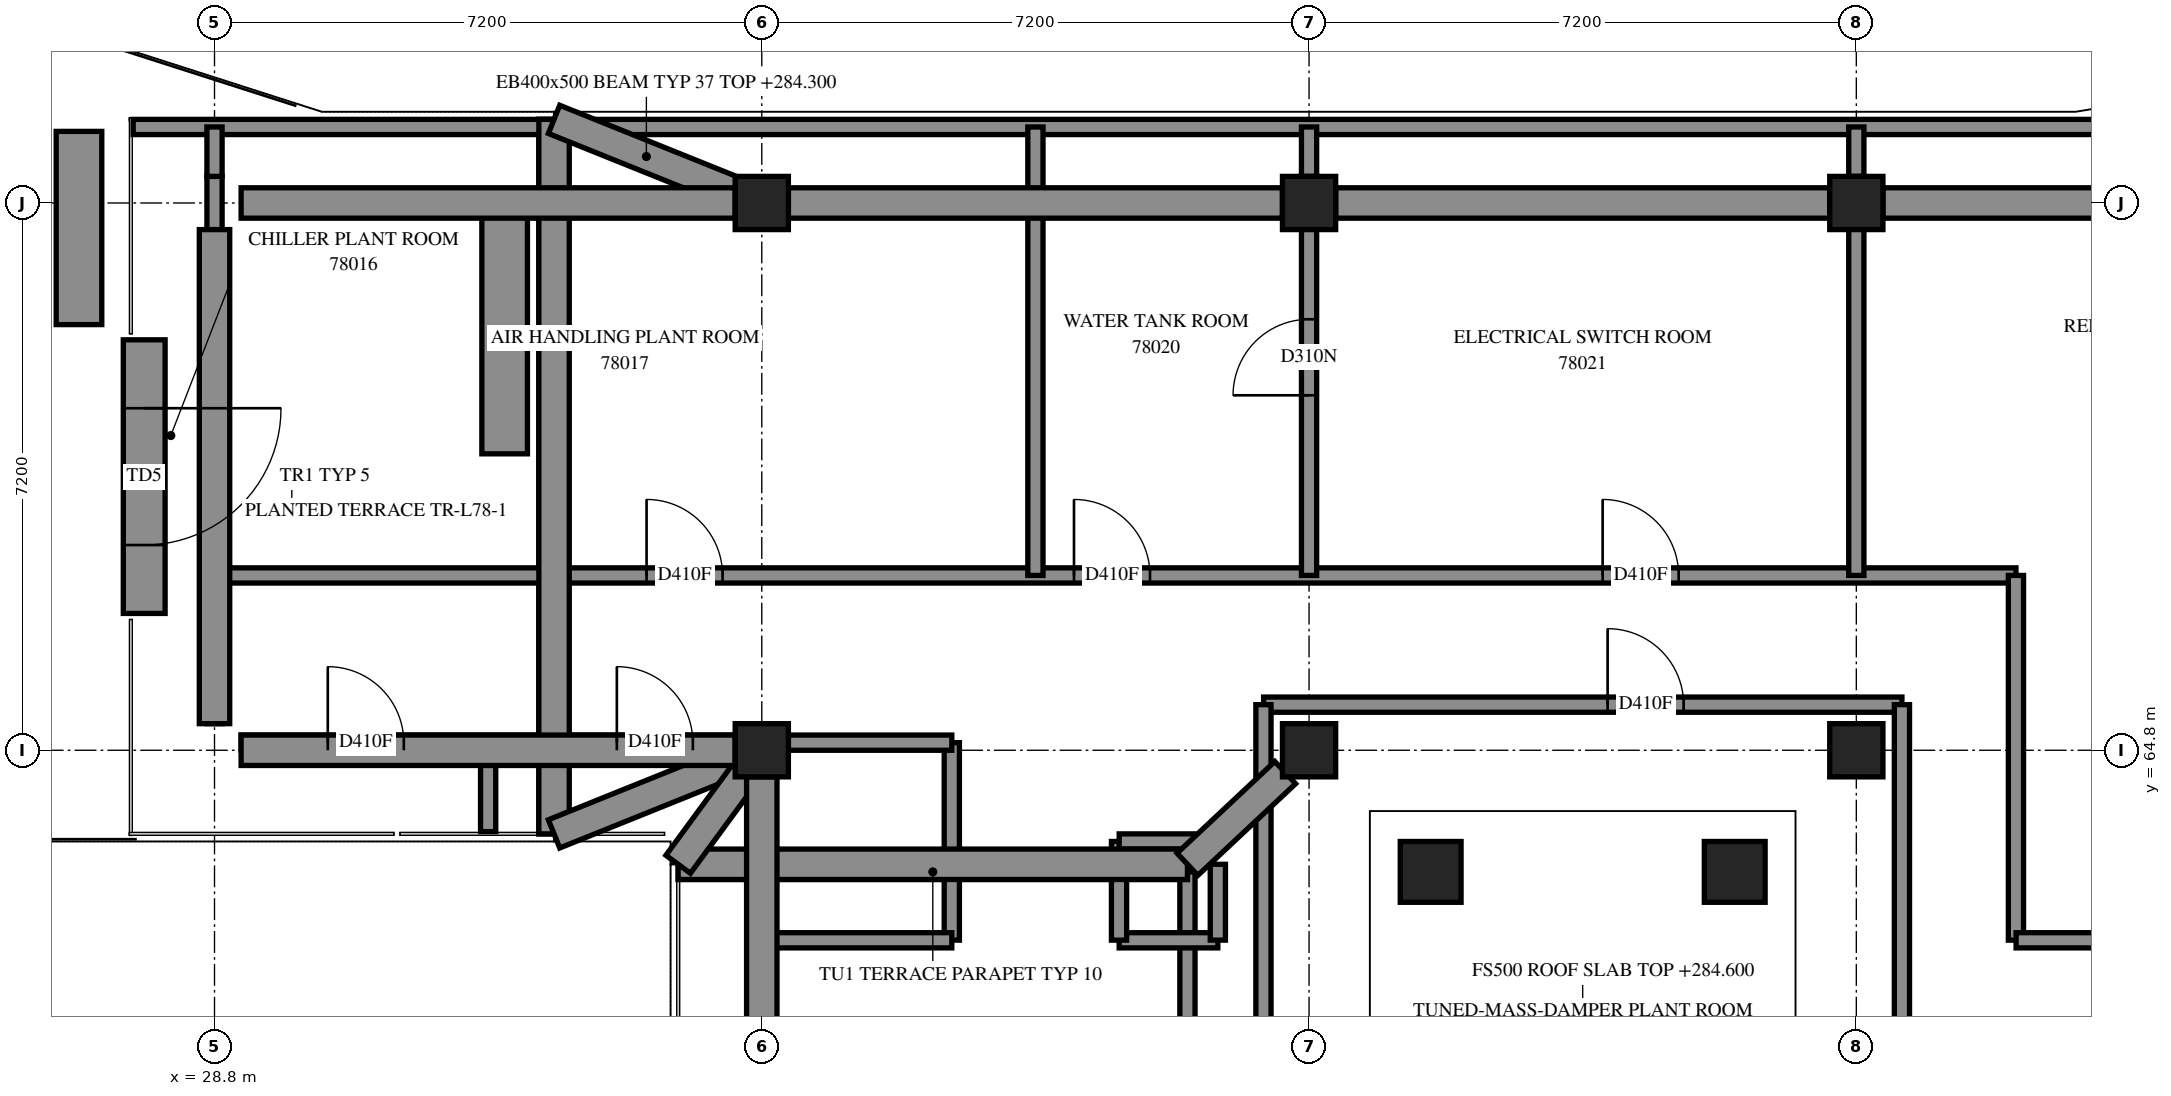
"""IFC4 building model, lengths in metres.
Left out: names, types, materials, properties, quantities, classifications, styles, units other than length and angle.
Written with IfcOpenShell. Run it as: python <this file> out.ifc"""

import sys

from ifc_helpers import new_model, si_unit, direction, frame, frame_2d, origin, origin_2d, place, context, subcontext, project, spatial, polyline, rectangle, outline, extrude, element, fill, save


model = new_model("IFC4")
c1 = context("Model", 3, precision=1e-05, world=origin(), true_north=direction((0.0, 1.0)))
c2 = subcontext(c1, "Body", "Model", "MODEL_VIEW")
j1 = project(units=[si_unit("LENGTHUNIT", "METRE"), si_unit("PLANEANGLEUNIT", "RADIAN")], contexts=[c1])
p1 = place(None, origin())
s1 = spatial("IfcSite", under=j1, at=p1, CompositionType="ELEMENT")
p2 = place(p1, origin())
s2 = spatial("IfcBuilding", under=s1, at=p2, CompositionType="ELEMENT")
p3 = place(p2, frame((0.0, 0.0, 284.6)))
s3 = spatial("IfcBuildingStorey", under=s2, at=p3, CompositionType="ELEMENT", Elevation=284.6)
for number, where, z_axis, x_axis in (
    (1, (36.0, 64.8, 0.0), (0.0, 0.0, 1.0), (1.0, 0.0, 0.0)),
    (2, (36.0, 72.0, 0.0), (0.0, 0.0, 1.0), (1.0, 0.0, 0.0)),
    (3, (43.2, 64.8, 0.0), (0.0, 0.0, 1.0), (1.0, 0.0, 0.0)),
    (4, (43.2, 72.0, 0.0), (0.0, 0.0, 1.0), (1.0, 0.0, 0.0)),
    (5, (50.4, 64.8, 0.0), (0.0, 0.0, 1.0), (1.0, 0.0, 0.0)),
    (6, (50.4, 72.0, 0.0), (0.0, 0.0, 1.0), (1.0, 0.0, 0.0)),
):
    element("IfcColumn", number, at=place(p3, frame(where, z_axis=z_axis, x_axis=x_axis)), inside=s3, PredefinedType="COLUMN", context=c2, shape_type="SweptSolid", body=[
        extrude(rectangle(XDim=0.7, YDim=0.7, at=origin_2d()), origin(), (0.0, 0.0, 1.0), 5.7),
    ])
for number, where, z_axis, x_axis in (
    (7, (48.8, 63.2, 0.5), (0.0, 0.0, 1.0), (1.0, 0.0, 0.0)),
    (8, (44.8, 63.2, 0.5), (0.0, 0.0, 1.0), (1.0, 0.0, 0.0)),
):
    element("IfcColumn", number, at=place(p3, frame(where, z_axis=z_axis, x_axis=x_axis)), inside=s3, PredefinedType="COLUMN", context=c2, shape_type="SweptSolid", body=[
        extrude(rectangle(XDim=0.8, YDim=0.8, at=origin_2d()), origin(), (0.0, 0.0, 1.0), 2.6),
    ])
p4 = place(p3, frame((27.875, 70.2, 0.0), z_axis=(0.0, 0.0, 1.0), x_axis=(0.0, -1.0, 0.0)))
e9 = element("IfcWall", 9, at=p4, inside=s3, PredefinedType="SOLIDWALL", context=c2, shape_type="SweptSolid", body=[
    extrude(rectangle(XDim=3.6, YDim=0.55, at=frame_2d((1.8, 0.0))), origin(), (0.0, 0.0, 1.0), 5.7),
])
p5 = place(p4, frame((0.9, 0.0, 0.0)))
e10 = element("IfcOpeningElement", 10, at=p5, cuts=e9, PredefinedType="OPENING", context=c2, shape_type="SweptSolid", body=[
    extrude(rectangle(XDim=1.8, YDim=2.4, at=frame_2d((0.9, 1.2))), frame((0.0, 0.285, 0.0), z_axis=(0.0, -1.0, 0.0), x_axis=(1.0, 0.0, 0.0)), (0.0, 0.0, 1.0), 0.57),
])
p6 = place(p3, frame((33.167, 63.7, 0.0), z_axis=(0.0, 0.0, 1.0), x_axis=(0.0, 1.0, 0.0)))
e11 = element("IfcWall", 11, at=p6, inside=s3, PredefinedType="PARAPET", context=c2, shape_type="SweptSolid", body=[
    extrude(outline(polyline([(0.0, -0.1), (9.4, -0.1), (9.4, 0.1), (0.0, 0.1), (0.0, -0.1)])), origin(), (0.0, 0.0, 1.0), 0.25),
])
p7 = place(p3, frame((27.017, 72.942, 0.0), z_axis=(0.0, 0.0, 1.0), x_axis=(0.0, -1.0, 0.0)))
e12 = element("IfcWall", 12, at=p7, inside=s3, PredefinedType="SOLIDWALL", context=c2, shape_type="SweptSolid", body=[
    extrude(rectangle(XDim=2.542, YDim=0.6, at=frame_2d((1.271, 0.0))), origin(), (0.0, 0.0, 1.0), 0.65),
])
p8 = place(p3, frame((32.617, 68.7, 0.0), z_axis=(0.0, 0.0, 1.0), x_axis=(0.0, 1.0, 0.0)))
e13 = element("IfcWall", 13, at=p8, inside=s3, PredefinedType="SOLIDWALL", context=c2, shape_type="SweptSolid", body=[
    extrude(rectangle(XDim=3.25, YDim=0.6, at=frame_2d((1.625, 0.0))), origin(), (0.0, 0.0, 1.0), 0.65),
])
p9 = place(p3, frame((41.6, 56.5, 0.0), z_axis=(0.0, 0.0, 1.0), x_axis=(0.0, 1.0, 0.0)))
e14 = element("IfcWall", 14, at=p9, inside=s3, PredefinedType="PARAPET", context=c2, shape_type="SweptSolid", body=[
    extrude(outline(polyline([(0.0, -0.1), (6.8, -0.1), (6.6, 0.1), (0.0, 0.1), (0.0, -0.1)])), origin(), (0.0, 0.0, 1.0), 0.25),
])
p10 = place(p3, frame((41.6, 63.2, 0.0), z_axis=(0.0, 0.0, 1.0), x_axis=(-1.0, 0.0, 0.0)))
e15 = element("IfcWall", 15, at=p10, inside=s3, PredefinedType="PARAPET", context=c2, shape_type="SweptSolid", body=[
    extrude(outline(polyline([(-0.1, -0.1), (6.7, -0.1), (6.7, 0.1), (0.1, 0.1), (-0.1, -0.1)])), origin(), (0.0, 0.0, 1.0), 0.25),
])
p11 = place(p3, frame((27.73, 73.0, 0.0), z_axis=(0.0, 0.0, 1.0), x_axis=(1.0, 0.0, 0.0)))
e16 = element("IfcWall", 16, at=p11, inside=s3, PredefinedType="PARTITIONING", context=c2, shape_type="SweptSolid", body=[
    extrude(rectangle(XDim=51.47, YDim=0.2, at=frame_2d((25.735, 0.0))), origin(), (0.0, 0.0, 1.0), 5.2),
])
p12 = place(p3, frame((28.8, 67.1, 0.0), z_axis=(0.0, 0.0, 1.0), x_axis=(1.0, 0.0, 0.0)))
e17 = element("IfcWall", 17, at=p12, inside=s3, PredefinedType="PARTITIONING", context=c2, shape_type="SweptSolid", body=[
    extrude(rectangle(XDim=23.7, YDim=0.2, at=frame_2d((11.85, 0.0))), origin(), (0.0, 0.0, 1.0), 5.7),
])
p13 = place(p12, frame((5.684, 0.0, 0.0)))
e18 = element("IfcOpeningElement", 18, at=p13, cuts=e17, PredefinedType="OPENING", context=c2, shape_type="SweptSolid", body=[
    extrude(rectangle(XDim=1.0, YDim=2.1, at=frame_2d((0.5, 1.05))), frame((0.0, 0.11, 0.0), z_axis=(0.0, -1.0, 0.0), x_axis=(1.0, 0.0, 0.0)), (0.0, 0.0, 1.0), 0.22),
])
p14 = place(p12, frame((11.307, 0.0, 0.0)))
e19 = element("IfcOpeningElement", 19, at=p14, cuts=e17, PredefinedType="OPENING", context=c2, shape_type="SweptSolid", body=[
    extrude(rectangle(XDim=1.0, YDim=2.1, at=frame_2d((0.5, 1.05))), frame((0.0, 0.11, 0.0), z_axis=(0.0, -1.0, 0.0), x_axis=(1.0, 0.0, 0.0)), (0.0, 0.0, 1.0), 0.22),
])
p15 = place(p12, frame((18.262, 0.0, 0.0)))
e20 = element("IfcOpeningElement", 20, at=p15, cuts=e17, PredefinedType="OPENING", context=c2, shape_type="SweptSolid", body=[
    extrude(rectangle(XDim=1.0, YDim=2.1, at=frame_2d((0.5, 1.05))), frame((0.0, 0.11, 0.0), z_axis=(0.0, -1.0, 0.0), x_axis=(1.0, 0.0, 0.0)), (0.0, 0.0, 1.0), 0.22),
])
p16 = place(p3, frame((42.602, 65.4, 0.0), z_axis=(0.0, 0.0, 1.0), x_axis=(1.0, 0.0, 0.0)))
e21 = element("IfcWall", 21, at=p16, inside=s3, PredefinedType="PARTITIONING", context=c2, shape_type="SweptSolid", body=[
    extrude(rectangle(XDim=8.398, YDim=0.2, at=frame_2d((4.199, 0.0))), origin(), (0.0, 0.0, 1.0), 5.7),
])
p17 = place(p16, frame((4.526, 0.0, 0.0)))
e22 = element("IfcOpeningElement", 22, at=p17, cuts=e21, PredefinedType="OPENING", context=c2, shape_type="SweptSolid", body=[
    extrude(rectangle(XDim=1.0, YDim=2.1, at=frame_2d((0.5, 1.05))), frame((0.0, 0.11, 0.0), z_axis=(0.0, -1.0, 0.0), x_axis=(1.0, 0.0, 0.0)), (0.0, 0.0, 1.0), 0.22),
])
p18 = place(p3, frame((29.15, 64.9, 0.0), z_axis=(0.0, 0.0, 1.0), x_axis=(1.0, 0.0, 0.0)))
e23 = element("IfcWall", 23, at=p18, inside=s3, PredefinedType="PARTITIONING", context=c2, shape_type="SweptSolid", body=[
    extrude(rectangle(XDim=7.2, YDim=0.2, at=frame_2d((3.6, 0.0))), origin(), (0.0, 0.0, 1.0), 5.7),
])
p19 = place(p18, frame((1.14, 0.0, 0.0)))
e24 = element("IfcOpeningElement", 24, at=p19, cuts=e23, PredefinedType="OPENING", context=c2, shape_type="SweptSolid", body=[
    extrude(rectangle(XDim=1.0, YDim=2.1, at=frame_2d((0.5, 1.05))), frame((0.0, 0.11, 0.0), z_axis=(0.0, -1.0, 0.0), x_axis=(1.0, 0.0, 0.0)), (0.0, 0.0, 1.0), 0.22),
])
p20 = place(p18, frame((4.943, 0.0, 0.0)))
e25 = element("IfcOpeningElement", 25, at=p20, cuts=e23, PredefinedType="OPENING", context=c2, shape_type="SweptSolid", body=[
    extrude(rectangle(XDim=1.0, YDim=2.1, at=frame_2d((0.5, 1.05))), frame((0.0, 0.11, 0.0), z_axis=(0.0, -1.0, 0.0), x_axis=(1.0, 0.0, 0.0)), (0.0, 0.0, 1.0), 0.22),
])
p21 = place(p3, frame((39.6, 67.1, 0.0), z_axis=(0.0, 0.0, 1.0), x_axis=(0.0, 1.0, 0.0)))
e26 = element("IfcWall", 26, at=p21, inside=s3, PredefinedType="PARTITIONING", context=c2, shape_type="SweptSolid", body=[
    extrude(rectangle(XDim=5.9, YDim=0.2, at=frame_2d((2.95, 0.0))), origin(), (0.0, 0.0, 1.0), 5.7),
])
p22 = place(p3, frame((51.0, 60.1, 0.0), z_axis=(0.0, 0.0, 1.0), x_axis=(0.0, 1.0, 0.0)))
e27 = element("IfcWall", 27, at=p22, inside=s3, PredefinedType="PARTITIONING", context=c2, shape_type="SweptSolid", body=[
    extrude(rectangle(XDim=5.3, YDim=0.2, at=frame_2d((2.65, 0.0))), origin(), (0.0, 0.0, 1.0), 5.7),
])
p23 = place(p3, frame((42.6, 60.1, 0.0), z_axis=(0.0, 0.0, 1.0), x_axis=(0.0, 1.0, 0.0)))
e28 = element("IfcWall", 28, at=p23, inside=s3, PredefinedType="PARTITIONING", context=c2, shape_type="SweptSolid", body=[
    extrude(rectangle(XDim=5.3, YDim=0.2, at=frame_2d((2.65, 0.0))), origin(), (0.0, 0.0, 1.0), 5.2),
])
p24 = place(p3, frame((52.5, 62.302, 0.0), z_axis=(0.0, 0.0, 1.0), x_axis=(0.0, 1.0, 0.0)))
e29 = element("IfcWall", 29, at=p24, inside=s3, PredefinedType="PARTITIONING", context=c2, shape_type="SweptSolid", body=[
    extrude(rectangle(XDim=4.798, YDim=0.2, at=frame_2d((2.399, 0.0))), origin(), (0.0, 0.0, 1.0), 5.7),
])
p25 = place(p3, frame((28.8, 67.1, 0.0), z_axis=(0.0, 0.0, 1.0), x_axis=(0.0, 1.0, 0.0)))
e30 = element("IfcWall", 30, at=p25, inside=s3, PredefinedType="PARTITIONING", context=c2, shape_type="SweptSolid", body=[
    extrude(rectangle(XDim=5.25, YDim=0.2, at=frame_2d((2.625, 0.0))), origin(), (0.0, 0.0, 1.0), 5.7),
])
p26 = place(p3, frame((43.2, 67.1, 0.0), z_axis=(0.0, 0.0, 1.0), x_axis=(0.0, 1.0, 0.0)))
e31 = element("IfcWall", 31, at=p26, inside=s3, PredefinedType="PARTITIONING", context=c2, shape_type="SweptSolid", body=[
    extrude(rectangle(XDim=5.25, YDim=0.2, at=frame_2d((2.625, 0.0))), origin(), (0.0, 0.0, 1.0), 5.7),
])
p27 = place(p26, frame((2.37, 0.0, 0.0)))
e32 = element("IfcOpeningElement", 32, at=p27, cuts=e31, PredefinedType="OPENING", context=c2, shape_type="SweptSolid", body=[
    extrude(rectangle(XDim=1.0, YDim=2.1, at=frame_2d((0.5, 1.05))), frame((0.0, 0.11, 0.0), z_axis=(0.0, -1.0, 0.0), x_axis=(1.0, 0.0, 0.0)), (0.0, 0.0, 1.0), 0.22),
])
p28 = place(p3, frame((50.4, 67.1, 0.0), z_axis=(0.0, 0.0, 1.0), x_axis=(0.0, 1.0, 0.0)))
e33 = element("IfcWall", 33, at=p28, inside=s3, PredefinedType="PARTITIONING", context=c2, shape_type="SweptSolid", body=[
    extrude(rectangle(XDim=5.25, YDim=0.2, at=frame_2d((2.625, 0.0))), origin(), (0.0, 0.0, 1.0), 5.7),
])
p29 = place(p3, frame((38.5, 62.302, 0.0), z_axis=(0.0, 0.0, 1.0), x_axis=(0.0, 1.0, 0.0)))
e34 = element("IfcWall", 34, at=p29, inside=s3, PredefinedType="PARTITIONING", context=c2, shape_type="SweptSolid", body=[
    extrude(rectangle(XDim=2.598, YDim=0.2, at=frame_2d((1.299, 0.0))), origin(), (0.0, 0.0, 1.0), 5.7),
])
p30 = place(p3, frame((36.002, 62.3, 0.0), z_axis=(0.0, 0.0, 1.0), x_axis=(1.0, 0.0, 0.0)))
e35 = element("IfcWall", 35, at=p30, inside=s3, PredefinedType="PARTITIONING", context=c2, shape_type="SweptSolid", body=[
    extrude(rectangle(XDim=2.498, YDim=0.2, at=frame_2d((1.249, 0.0))), origin(), (0.0, 0.0, 1.0), 5.7),
])
p31 = place(p3, frame((52.502, 62.3, 0.0), z_axis=(0.0, 0.0, 1.0), x_axis=(1.0, 0.0, 0.0)))
e36 = element("IfcWall", 36, at=p31, inside=s3, PredefinedType="PARTITIONING", context=c2, shape_type="SweptSolid", body=[
    extrude(rectangle(XDim=2.498, YDim=0.2, at=frame_2d((1.249, 0.0))), origin(), (0.0, 0.0, 1.0), 5.7),
])
p32 = place(p31, frame((1.299, 0.0, 0.0)))
e37 = element("IfcOpeningElement", 37, at=p32, cuts=e36, PredefinedType="OPENING", context=c2, shape_type="SweptSolid", body=[
    extrude(rectangle(XDim=1.0, YDim=2.1, at=frame_2d((0.5, 1.05))), frame((0.0, 0.11, 0.0), z_axis=(0.0, -1.0, 0.0), x_axis=(1.0, 0.0, 0.0)), (0.0, 0.0, 1.0), 0.22),
])
p33 = place(p3, frame((36.0, 60.1, 0.0), z_axis=(0.0, 0.0, 1.0), x_axis=(0.0, 1.0, 0.0)))
e38 = element("IfcWall", 38, at=p33, inside=s3, PredefinedType="PARTITIONING", context=c2, shape_type="SweptSolid", body=[
    extrude(rectangle(XDim=2.2, YDim=0.2, at=frame_2d((1.1, 0.0))), origin(), (0.0, 0.0, 1.0), 5.7),
])
p34 = place(p3, frame((36.35, 64.9, 0.0), z_axis=(0.0, 0.0, 1.0), x_axis=(1.0, 0.0, 0.0)))
e39 = element("IfcWall", 39, at=p34, inside=s3, PredefinedType="PARTITIONING", context=c2, shape_type="SweptSolid", body=[
    extrude(rectangle(XDim=2.15, YDim=0.2, at=frame_2d((1.075, 0.0))), origin(), (0.0, 0.0, 1.0), 5.2),
])
p35 = place(p3, frame((28.8, 65.15, 0.0), z_axis=(0.0, 0.0, 1.0), x_axis=(0.0, 1.0, 0.0)))
e40 = element("IfcWall", 40, at=p35, inside=s3, PredefinedType="PARTITIONING", context=c2, shape_type="SweptSolid", body=[
    extrude(rectangle(XDim=1.95, YDim=0.2, at=frame_2d((0.975, 0.0))), origin(), (0.0, 0.0, 1.0), 5.7),
])
p36 = place(p3, frame((40.702, 62.3, 0.0), z_axis=(0.0, 0.0, 1.0), x_axis=(1.0, 0.0, 0.0)))
e41 = element("IfcWall", 41, at=p36, inside=s3, PredefinedType="PARTITIONING", context=c2, shape_type="SweptSolid", body=[
    extrude(rectangle(XDim=1.298, YDim=0.2, at=frame_2d((0.649, 0.0))), origin(), (0.0, 0.0, 1.0), 5.7),
])
p37 = place(p3, frame((40.7, 62.302, 0.0), z_axis=(0.0, 0.0, 1.0), x_axis=(0.0, 1.0, 0.0)))
e42 = element("IfcWall", 42, at=p37, inside=s3, PredefinedType="PARTITIONING", context=c2, shape_type="SweptSolid", body=[
    extrude(rectangle(XDim=1.298, YDim=0.2, at=frame_2d((0.649, 0.0))), origin(), (0.0, 0.0, 1.0), 5.2),
])
p38 = place(p3, frame((32.4, 63.73, 0.0), z_axis=(0.0, 0.0, 1.0), x_axis=(0.0, 1.0, 0.0)))
e43 = element("IfcWall", 43, at=p38, inside=s3, PredefinedType="PARTITIONING", context=c2, shape_type="SweptSolid", body=[
    extrude(rectangle(XDim=1.17, YDim=0.2, at=frame_2d((0.585, 0.0))), origin(), (0.0, 0.0, 1.0), 5.7),
])
p39 = place(p3, frame((40.702, 63.6, 0.0), z_axis=(0.0, 0.0, 1.0), x_axis=(1.0, 0.0, 0.0)))
e44 = element("IfcWall", 44, at=p39, inside=s3, PredefinedType="PARTITIONING", context=c2, shape_type="SweptSolid", body=[
    extrude(rectangle(XDim=0.998, YDim=0.2, at=frame_2d((0.499, 0.0))), origin(), (0.0, 0.0, 1.0), 5.2),
])
p40 = place(p3, frame((42.0, 62.302, 0.0), z_axis=(0.0, 0.0, 1.0), x_axis=(0.0, 1.0, 0.0)))
e45 = element("IfcWall", 45, at=p40, inside=s3, PredefinedType="PARTITIONING", context=c2, shape_type="SweptSolid", body=[
    extrude(rectangle(XDim=0.998, YDim=0.2, at=frame_2d((0.499, 0.0))), origin(), (0.0, 0.0, 1.0), 5.7),
])
for number, where, z_axis, x_axis in (
    (46, (28.8, 72.35, 0.0), (0.0, 0.0, 1.0), (0.0, 1.0, 0.0)),
    (47, (43.2, 72.35, 0.0), (0.0, 0.0, 1.0), (0.0, 1.0, 0.0)),
    (48, (50.4, 72.35, 0.0), (0.0, 0.0, 1.0), (0.0, 1.0, 0.0)),
):
    element("IfcWall", number, at=place(p3, frame(where, z_axis=z_axis, x_axis=x_axis)), inside=s3, PredefinedType="PARTITIONING", context=c2, shape_type="SweptSolid", body=[
        extrude(rectangle(XDim=0.65, YDim=0.2, at=frame_2d((0.325, 0.0))), origin(), (0.0, 0.0, 1.0), 5.7),
    ])
p41 = place(p5, origin())
e49 = element("IfcDoor", 49, at=p41, inside=s3, OperationType="SINGLE_SWING_LEFT", PredefinedType="DOOR", context=c2, shape_type="SweptSolid", body=[
    extrude(rectangle(XDim=1.8, YDim=2.4, at=frame_2d((0.9, 1.2))), frame((0.0, 0.025, 0.0), z_axis=(0.0, -1.0, 0.0), x_axis=(1.0, 0.0, 0.0)), (0.0, 0.0, 1.0), 0.05),
])
fill(e10, e49)
p42 = place(p19, origin())
e50 = element("IfcDoor", 50, at=p42, inside=s3, OperationType="SINGLE_SWING_RIGHT", PredefinedType="DOOR", context=c2, shape_type="SweptSolid", body=[
    extrude(rectangle(XDim=1.0, YDim=2.1, at=frame_2d((0.5, 1.05))), frame((0.0, 0.025, 0.0), z_axis=(0.0, -1.0, 0.0), x_axis=(1.0, 0.0, 0.0)), (0.0, 0.0, 1.0), 0.05),
])
fill(e24, e50)
p43 = place(p13, origin())
e51 = element("IfcDoor", 51, at=p43, inside=s3, OperationType="SINGLE_SWING_RIGHT", PredefinedType="DOOR", context=c2, shape_type="SweptSolid", body=[
    extrude(rectangle(XDim=1.0, YDim=2.1, at=frame_2d((0.5, 1.05))), frame((0.0, 0.025, 0.0), z_axis=(0.0, -1.0, 0.0), x_axis=(1.0, 0.0, 0.0)), (0.0, 0.0, 1.0), 0.05),
])
fill(e18, e51)
p44 = place(p20, origin())
e52 = element("IfcDoor", 52, at=p44, inside=s3, OperationType="SINGLE_SWING_RIGHT", PredefinedType="DOOR", context=c2, shape_type="SweptSolid", body=[
    extrude(rectangle(XDim=1.0, YDim=2.1, at=frame_2d((0.5, 1.05))), frame((0.0, 0.025, 0.0), z_axis=(0.0, -1.0, 0.0), x_axis=(1.0, 0.0, 0.0)), (0.0, 0.0, 1.0), 0.05),
])
fill(e25, e52)
p45 = place(p14, origin())
e53 = element("IfcDoor", 53, at=p45, inside=s3, OperationType="SINGLE_SWING_LEFT", PredefinedType="DOOR", context=c2, shape_type="SweptSolid", body=[
    extrude(rectangle(XDim=1.0, YDim=2.1, at=frame_2d((0.5, 1.05))), frame((0.0, 0.025, 0.0), z_axis=(0.0, -1.0, 0.0), x_axis=(1.0, 0.0, 0.0)), (0.0, 0.0, 1.0), 0.05),
])
fill(e19, e53)
p46 = place(p15, origin())
e54 = element("IfcDoor", 54, at=p46, inside=s3, OperationType="SINGLE_SWING_RIGHT", PredefinedType="DOOR", context=c2, shape_type="SweptSolid", body=[
    extrude(rectangle(XDim=1.0, YDim=2.1, at=frame_2d((0.5, 1.05))), frame((0.0, 0.025, 0.0), z_axis=(0.0, -1.0, 0.0), x_axis=(1.0, 0.0, 0.0)), (0.0, 0.0, 1.0), 0.05),
])
fill(e20, e54)
p47 = place(p17, origin())
e55 = element("IfcDoor", 55, at=p47, inside=s3, OperationType="SINGLE_SWING_LEFT", PredefinedType="DOOR", context=c2, shape_type="SweptSolid", body=[
    extrude(rectangle(XDim=1.0, YDim=2.1, at=frame_2d((0.5, 1.05))), frame((0.0, 0.025, 0.0), z_axis=(0.0, -1.0, 0.0), x_axis=(1.0, 0.0, 0.0)), (0.0, 0.0, 1.0), 0.05),
])
fill(e22, e55)
p48 = place(p27, origin())
e56 = element("IfcDoor", 56, at=p48, inside=s3, OperationType="SINGLE_SWING_LEFT", PredefinedType="DOOR", context=c2, shape_type="SweptSolid", body=[
    extrude(rectangle(XDim=1.0, YDim=2.1, at=frame_2d((0.5, 1.05))), frame((0.0, 0.025, 0.0), z_axis=(0.0, -1.0, 0.0), x_axis=(1.0, 0.0, 0.0)), (0.0, 0.0, 1.0), 0.05),
])
fill(e32, e56)
save(model, sys.argv[1])
